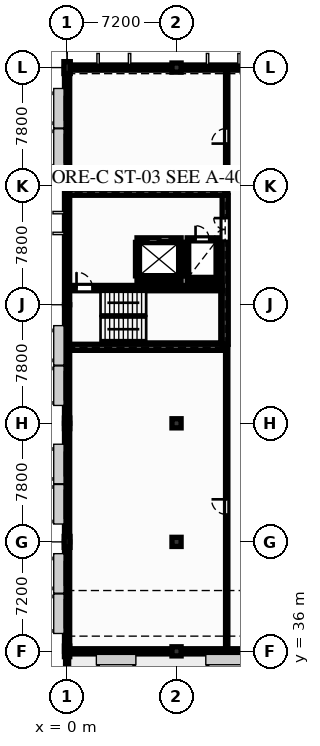
"""IFC4 building model, lengths in metres.
Left out: names, types, materials, properties, quantities, classifications, styles, units other than length and angle.
Written with IfcOpenShell. Run it as: python <this file> out.ifc"""

import sys

from ifc_helpers import new_model, si_unit, direction, frame, frame_2d, origin, origin_2d, place, context, subcontext, project, spatial, rectangle, extrude, element, fill, save


model = new_model("IFC4")
c1 = context("Model", 3, precision=1e-05, world=origin(), true_north=direction((0.0, 1.0)))
c2 = subcontext(c1, "Body", "Model", "MODEL_VIEW")
j1 = project(units=[si_unit("LENGTHUNIT", "METRE"), si_unit("PLANEANGLEUNIT", "RADIAN")], contexts=[c1])
p1 = place(None, origin())
s1 = spatial("IfcSite", under=j1, at=p1, CompositionType="ELEMENT")
p2 = place(p1, origin())
s2 = spatial("IfcBuilding", under=s1, at=p2, CompositionType="ELEMENT")
p3 = place(p2, frame((0.0, 0.0, 8.94)))
s3 = spatial("IfcBuildingStorey", under=s2, at=p3, CompositionType="ELEMENT", Elevation=8.94)
p4 = place(p3, frame((0.0, 36.0, 0.0), z_axis=(0.0, 0.0, 1.0), x_axis=(1.0, 0.0, 0.0)))
e1 = element("IfcColumn", 1, at=p4, inside=s3, PredefinedType="PILASTER", context=c2, shape_type="SweptSolid", body=[
    extrude(rectangle(XDim=0.35, YDim=0.7, at=origin_2d()), origin(), (0.0, 0.0, 1.0), 3.84),
])
p5 = place(p3, frame((0.0, 43.2, 0.0), z_axis=(0.0, 0.0, 1.0), x_axis=(1.0, 0.0, 0.0)))
e2 = element("IfcColumn", 2, at=p5, inside=s3, PredefinedType="PILASTER", context=c2, shape_type="SweptSolid", body=[
    extrude(rectangle(XDim=0.38, YDim=0.72, at=origin_2d()), origin(), (0.0, 0.0, 1.0), 3.84),
])
p6 = place(p3, frame((0.0, 51.0, 0.0), z_axis=(0.0, 0.0, 1.0), x_axis=(1.0, 0.0, 0.0)))
e3 = element("IfcColumn", 3, at=p6, inside=s3, PredefinedType="PILASTER", context=c2, shape_type="SweptSolid", body=[
    extrude(rectangle(XDim=0.35, YDim=0.7, at=origin_2d()), origin(), (0.0, 0.0, 1.0), 3.84),
])
p7 = place(p3, frame((0.0, 74.4, 0.0), z_axis=(0.0, 0.0, 1.0), x_axis=(1.0, 0.0, 0.0)))
e4 = element("IfcColumn", 4, at=p7, inside=s3, PredefinedType="PILASTER", context=c2, shape_type="SweptSolid", body=[
    extrude(rectangle(XDim=0.42, YDim=0.78, at=origin_2d()), origin(), (0.0, 0.0, 1.0), 3.84),
])
for number, where, z_axis, x_axis in (
    (5, (7.2, 36.0, 0.0), (0.0, 0.0, 1.0), (1.0, 0.0, 0.0)),
    (6, (7.2, 43.2, 0.0), (0.0, 0.0, 1.0), (1.0, 0.0, 0.0)),
    (7, (7.2, 51.0, 0.0), (0.0, 0.0, 1.0), (1.0, 0.0, 0.0)),
    (8, (7.2, 74.4, 0.0), (0.0, 0.0, 1.0), (1.0, 0.0, 0.0)),
):
    element("IfcColumn", number, at=place(p3, frame(where, z_axis=z_axis, x_axis=x_axis)), inside=s3, PredefinedType="COLUMN", context=c2, shape_type="SweptSolid", body=[
        extrude(rectangle(XDim=0.6, YDim=0.6, at=origin_2d()), origin(), (0.0, 0.0, 1.0), 3.84),
    ])
p8 = place(p3, frame((0.0, 36.0, 0.0), z_axis=(0.0, 0.0, 1.0), x_axis=(0.0, 1.0, 0.0)))
e9 = element("IfcWall", 9, at=p8, inside=s3, PredefinedType="SOLIDWALL", context=c2, shape_type="SweptSolid", body=[
    extrude(rectangle(XDim=7.2, YDim=0.34, at=frame_2d((3.6, 0.0))), origin(), (0.0, 0.0, 1.0), 3.53),
])
p9 = place(p8, frame((1.5, 0.0, 0.85)))
e10 = element("IfcOpeningElement", 10, at=p9, cuts=e9, PredefinedType="OPENING", context=c2, shape_type="SweptSolid", body=[
    extrude(rectangle(XDim=1.95, YDim=2.1, at=frame_2d((0.975, 1.05))), frame((0.0, 0.18, 0.0), z_axis=(0.0, -1.0, 0.0), x_axis=(1.0, 0.0, 0.0)), (0.0, 0.0, 1.0), 0.36),
])
p10 = place(p8, frame((4.3, 0.0, 0.798)))
e11 = element("IfcOpeningElement", 11, at=p10, cuts=e9, PredefinedType="OPENING", context=c2, shape_type="SweptSolid", body=[
    extrude(rectangle(XDim=1.65, YDim=2.25, at=frame_2d((0.825, 1.125))), frame((0.0, 0.18, 0.0), z_axis=(0.0, -1.0, 0.0), x_axis=(1.0, 0.0, 0.0)), (0.0, 0.0, 1.0), 0.36),
])
p11 = place(p3, frame((0.0, 43.2, 0.0), z_axis=(0.0, 0.0, 1.0), x_axis=(0.0, 1.0, 0.0)))
e12 = element("IfcWall", 12, at=p11, inside=s3, PredefinedType="SOLIDWALL", context=c2, shape_type="SweptSolid", body=[
    extrude(rectangle(XDim=7.8, YDim=0.34, at=frame_2d((3.9, 0.0))), origin(), (0.0, 0.0, 1.0), 3.53),
])
p12 = place(p11, frame((1.5, 0.0, 0.85)))
e13 = element("IfcOpeningElement", 13, at=p12, cuts=e12, PredefinedType="OPENING", context=c2, shape_type="SweptSolid", body=[
    extrude(rectangle(XDim=1.95, YDim=2.1, at=frame_2d((0.975, 1.05))), frame((0.0, 0.18, 0.0), z_axis=(0.0, -1.0, 0.0), x_axis=(1.0, 0.0, 0.0)), (0.0, 0.0, 1.0), 0.36),
])
p13 = place(p11, frame((4.3, 0.0, 0.798)))
e14 = element("IfcOpeningElement", 14, at=p13, cuts=e12, PredefinedType="OPENING", context=c2, shape_type="SweptSolid", body=[
    extrude(rectangle(XDim=1.65, YDim=2.25, at=frame_2d((0.825, 1.125))), frame((0.0, 0.18, 0.0), z_axis=(0.0, -1.0, 0.0), x_axis=(1.0, 0.0, 0.0)), (0.0, 0.0, 1.0), 0.36),
])
p14 = place(p3, frame((0.0, 51.0, 0.0), z_axis=(0.0, 0.0, 1.0), x_axis=(0.0, 1.0, 0.0)))
e15 = element("IfcWall", 15, at=p14, inside=s3, PredefinedType="SOLIDWALL", context=c2, shape_type="SweptSolid", body=[
    extrude(rectangle(XDim=7.8, YDim=0.34, at=frame_2d((3.9, 0.0))), origin(), (0.0, 0.0, 1.0), 3.53),
])
p15 = place(p14, frame((1.5, 0.0, 0.85)))
e16 = element("IfcOpeningElement", 16, at=p15, cuts=e15, PredefinedType="OPENING", context=c2, shape_type="SweptSolid", body=[
    extrude(rectangle(XDim=1.95, YDim=2.1, at=frame_2d((0.975, 1.05))), frame((0.0, 0.18, 0.0), z_axis=(0.0, -1.0, 0.0), x_axis=(1.0, 0.0, 0.0)), (0.0, 0.0, 1.0), 0.36),
])
p16 = place(p3, frame((0.0, 58.8, 0.0), z_axis=(0.0, 0.0, 1.0), x_axis=(0.0, 1.0, 0.0)))
e17 = element("IfcWall", 17, at=p16, inside=s3, PredefinedType="SOLIDWALL", context=c2, shape_type="SweptSolid", body=[
    extrude(rectangle(XDim=7.8, YDim=0.34, at=frame_2d((3.9, 0.0))), origin(), (0.0, 0.0, 1.0), 3.53),
])
p17 = place(p16, frame((4.85, 0.0, 1.1)))
e18 = element("IfcOpeningElement", 18, at=p17, cuts=e17, PredefinedType="OPENING", context=c2, shape_type="SweptSolid", body=[
    extrude(rectangle(XDim=1.05, YDim=1.75, at=frame_2d((0.525, 0.875))), frame((0.0, 0.18, 0.0), z_axis=(0.0, -1.0, 0.0), x_axis=(1.0, 0.0, 0.0)), (0.0, 0.0, 1.0), 0.36),
])
p18 = place(p3, frame((0.0, 66.6, 0.0), z_axis=(0.0, 0.0, 1.0), x_axis=(0.0, 1.0, 0.0)))
e19 = element("IfcWall", 19, at=p18, inside=s3, PredefinedType="SOLIDWALL", context=c2, shape_type="SweptSolid", body=[
    extrude(rectangle(XDim=7.8, YDim=0.34, at=frame_2d((3.9, 0.0))), origin(), (0.0, 0.0, 1.0), 3.53),
])
p19 = place(p18, frame((1.5, 0.0, 0.85)))
e20 = element("IfcOpeningElement", 20, at=p19, cuts=e19, PredefinedType="OPENING", context=c2, shape_type="SweptSolid", body=[
    extrude(rectangle(XDim=1.95, YDim=2.1, at=frame_2d((0.975, 1.05))), frame((0.0, 0.18, 0.0), z_axis=(0.0, -1.0, 0.0), x_axis=(1.0, 0.0, 0.0)), (0.0, 0.0, 1.0), 0.36),
])
p20 = place(p18, frame((4.3, 0.0, 0.85)))
e21 = element("IfcOpeningElement", 21, at=p20, cuts=e19, PredefinedType="OPENING", context=c2, shape_type="SweptSolid", body=[
    extrude(rectangle(XDim=1.65, YDim=2.25, at=frame_2d((0.825, 1.125))), frame((0.0, 0.18, 0.0), z_axis=(0.0, -1.0, 0.0), x_axis=(1.0, 0.0, 0.0)), (0.0, 0.0, 1.0), 0.36),
])
p21 = place(p3, frame((0.0, 74.4, 0.0), z_axis=(0.0, 0.0, 1.0), x_axis=(1.0, 0.0, 0.0)))
e22 = element("IfcWall", 22, at=p21, inside=s3, PredefinedType="SOLIDWALL", context=c2, shape_type="SweptSolid", body=[
    extrude(rectangle(XDim=7.2, YDim=0.34, at=frame_2d((3.6, 0.0))), origin(), (0.0, 0.0, 1.0), 3.53),
])
p22 = place(p21, frame((2.2, 0.0, 0.9)))
e23 = element("IfcOpeningElement", 23, at=p22, cuts=e22, PredefinedType="OPENING", context=c2, shape_type="SweptSolid", body=[
    extrude(rectangle(XDim=1.75, YDim=2.15, at=frame_2d((0.875, 1.075))), frame((0.0, 0.18, 0.0), z_axis=(0.0, -1.0, 0.0), x_axis=(1.0, 0.0, 0.0)), (0.0, 0.0, 1.0), 0.36),
])
p23 = place(p3, frame((0.0, 36.0, 0.0), z_axis=(0.0, 0.0, 1.0), x_axis=(1.0, 0.0, 0.0)))
e24 = element("IfcWall", 24, at=p23, inside=s3, PredefinedType="SOLIDWALL", context=c2, shape_type="SweptSolid", body=[
    extrude(rectangle(XDim=7.2, YDim=0.34, at=frame_2d((3.6, 0.0))), origin(), (0.0, 0.0, 1.0), 3.53),
])
p24 = place(p23, frame((2.2, 0.0, 0.9)))
e25 = element("IfcOpeningElement", 25, at=p24, cuts=e24, PredefinedType="OPENING", context=c2, shape_type="SweptSolid", body=[
    extrude(rectangle(XDim=2.05, YDim=1.85, at=frame_2d((1.025, 0.925))), frame((0.0, 0.18, 0.0), z_axis=(0.0, -1.0, 0.0), x_axis=(1.0, 0.0, 0.0)), (0.0, 0.0, 1.0), 0.36),
])
p25 = place(p3, frame((7.2, 74.4, 0.0), z_axis=(0.0, 0.0, 1.0), x_axis=(1.0, 0.0, 0.0)))
e26 = element("IfcWall", 26, at=p25, inside=s3, PredefinedType="SOLIDWALL", context=c2, shape_type="SweptSolid", body=[
    extrude(rectangle(XDim=7.2, YDim=0.34, at=frame_2d((3.6, 0.0))), origin(), (0.0, 0.0, 1.0), 3.53),
])
p26 = place(p25, frame((4.4, 0.0, 0.9)))
e27 = element("IfcOpeningElement", 27, at=p26, cuts=e26, PredefinedType="OPENING", context=c2, shape_type="SweptSolid", body=[
    extrude(rectangle(XDim=1.75, YDim=2.15, at=frame_2d((0.875, 1.075))), frame((0.0, 0.18, 0.0), z_axis=(0.0, -1.0, 0.0), x_axis=(1.0, 0.0, 0.0)), (0.0, 0.0, 1.0), 0.36),
])
p27 = place(p3, frame((7.2, 36.0, 0.0), z_axis=(0.0, 0.0, 1.0), x_axis=(1.0, 0.0, 0.0)))
e28 = element("IfcWall", 28, at=p27, inside=s3, PredefinedType="SOLIDWALL", context=c2, shape_type="SweptSolid", body=[
    extrude(rectangle(XDim=7.2, YDim=0.34, at=frame_2d((3.6, 0.0))), origin(), (0.0, 0.0, 1.0), 3.53),
])
p28 = place(p27, frame((4.4, 0.0, 0.9)))
e29 = element("IfcOpeningElement", 29, at=p28, cuts=e28, PredefinedType="OPENING", context=c2, shape_type="SweptSolid", body=[
    extrude(rectangle(XDim=2.05, YDim=1.85, at=frame_2d((1.025, 0.925))), frame((0.0, 0.18, 0.0), z_axis=(0.0, -1.0, 0.0), x_axis=(1.0, 0.0, 0.0)), (0.0, 0.0, 1.0), 0.36),
])
p29 = place(p3, frame((0.0, 35.8, 0.0), z_axis=(0.0, 0.0, 1.0), x_axis=(0.0, -1.0, 0.0)))
e30 = element("IfcWall", 30, at=p29, inside=s3, PredefinedType="PARAPET", context=c2, shape_type="SweptSolid", body=[
    extrude(rectangle(XDim=6.8, YDim=0.2, at=frame_2d((3.4, 0.0))), origin(), (0.0, 0.0, 1.0), 0.72),
])
for number, where, z_axis, x_axis in (
    (31, (0.17, 56.0, 0.0), (0.0, 0.0, 1.0), (1.0, 0.0, 0.0)),
    (32, (0.17, 66.2, 0.0), (0.0, 0.0, 1.0), (1.0, 0.0, 0.0)),
):
    element("IfcWall", number, at=place(p3, frame(where, z_axis=z_axis, x_axis=x_axis)), inside=s3, PredefinedType="SHEAR", context=c2, shape_type="SweptSolid", body=[
        extrude(rectangle(XDim=10.23, YDim=0.4, at=frame_2d((5.115, 0.0))), origin(), (0.0, 0.0, 1.0), 3.53),
    ])
p30 = place(p3, frame((10.4, 56.2, 0.0), z_axis=(0.0, 0.0, 1.0), x_axis=(0.0, 1.0, 0.0)))
e33 = element("IfcWall", 33, at=p30, inside=s3, PredefinedType="SHEAR", context=c2, shape_type="SweptSolid", body=[
    extrude(rectangle(XDim=9.8, YDim=0.4, at=frame_2d((4.9, 0.0))), origin(), (0.0, 0.0, 1.0), 3.53),
])
p31 = place(p30, frame((6.8, 0.0, 0.0)))
e34 = element("IfcOpeningElement", 34, at=p31, cuts=e33, PredefinedType="OPENING", context=c2, shape_type="SweptSolid", body=[
    extrude(rectangle(XDim=1.5, YDim=2.2, at=frame_2d((0.75, 1.1))), frame((0.0, 0.21, 0.0), z_axis=(0.0, -1.0, 0.0), x_axis=(1.0, 0.0, 0.0)), (0.0, 0.0, 1.0), 0.42),
])
p32 = place(p3, frame((0.17, 59.895, 0.0), z_axis=(0.0, 0.0, 1.0), x_axis=(1.0, 0.0, 0.0)))
e35 = element("IfcWall", 35, at=p32, inside=s3, PredefinedType="SHEAR", context=c2, shape_type="SweptSolid", body=[
    extrude(rectangle(XDim=10.03, YDim=0.35, at=frame_2d((5.015, 0.0))), origin(), (0.0, 0.0, 1.0), 3.53),
])
p33 = place(p32, frame((0.45, 0.0, 0.0)))
e36 = element("IfcOpeningElement", 36, at=p33, cuts=e35, PredefinedType="OPENING", context=c2, shape_type="SweptSolid", body=[
    extrude(rectangle(XDim=1.05, YDim=2.2, at=frame_2d((0.525, 1.1))), frame((0.0, 0.185, 0.0), z_axis=(0.0, -1.0, 0.0), x_axis=(1.0, 0.0, 0.0)), (0.0, 0.0, 1.0), 0.37),
])
p34 = place(p3, frame((4.6, 60.5, 0.0), z_axis=(0.0, 0.0, 1.0), x_axis=(1.0, 0.0, 0.0)))
e37 = element("IfcWall", 37, at=p34, inside=s3, PredefinedType="PARTITIONING", context=c2, shape_type="SweptSolid", body=[
    extrude(rectangle(XDim=2.9, YDim=0.2, at=frame_2d((1.45, 0.0))), origin(), (0.0, 0.0, 1.0), 3.53),
])
p35 = place(p3, frame((4.6, 63.1, 0.0), z_axis=(0.0, 0.0, 1.0), x_axis=(1.0, 0.0, 0.0)))
e38 = element("IfcWall", 38, at=p35, inside=s3, PredefinedType="PARTITIONING", context=c2, shape_type="SweptSolid", body=[
    extrude(rectangle(XDim=2.9, YDim=0.2, at=frame_2d((1.45, 0.0))), origin(), (0.0, 0.0, 1.0), 3.53),
])
p36 = place(p35, frame((0.75, 0.0, 0.0)))
e39 = element("IfcOpeningElement", 39, at=p36, cuts=e38, PredefinedType="OPENING", context=c2, shape_type="SweptSolid", body=[
    extrude(rectangle(XDim=1.4, YDim=2.25, at=frame_2d((0.7, 1.125))), frame((0.0, 0.11, 0.0), z_axis=(0.0, -1.0, 0.0), x_axis=(1.0, 0.0, 0.0)), (0.0, 0.0, 1.0), 0.22),
])
for number, where, z_axis, x_axis in (
    (40, (4.6, 60.7, 0.0), (0.0, 0.0, 1.0), (0.0, 1.0, 0.0)),
    (41, (7.5, 60.7, 0.0), (0.0, 0.0, 1.0), (0.0, 1.0, 0.0)),
):
    element("IfcWall", number, at=place(p3, frame(where, z_axis=z_axis, x_axis=x_axis)), inside=s3, PredefinedType="PARTITIONING", context=c2, shape_type="SweptSolid", body=[
        extrude(rectangle(XDim=2.2, YDim=0.2, at=frame_2d((1.1, 0.0))), origin(), (0.0, 0.0, 1.0), 3.53),
    ])
p37 = place(p3, frame((7.9, 60.5, 0.0), z_axis=(0.0, 0.0, 1.0), x_axis=(1.0, 0.0, 0.0)))
e42 = element("IfcWall", 42, at=p37, inside=s3, PredefinedType="PARTITIONING", context=c2, shape_type="SweptSolid", body=[
    extrude(rectangle(XDim=2.0, YDim=0.2, at=frame_2d((1.0, 0.0))), origin(), (0.0, 0.0, 1.0), 3.53),
])
p38 = place(p3, frame((7.9, 63.1, 0.0), z_axis=(0.0, 0.0, 1.0), x_axis=(1.0, 0.0, 0.0)))
e43 = element("IfcWall", 43, at=p38, inside=s3, PredefinedType="PARTITIONING", context=c2, shape_type="SweptSolid", body=[
    extrude(rectangle(XDim=2.0, YDim=0.2, at=frame_2d((1.0, 0.0))), origin(), (0.0, 0.0, 1.0), 3.53),
])
p39 = place(p38, frame((0.55, 0.0, 0.0)))
e44 = element("IfcOpeningElement", 44, at=p39, cuts=e43, PredefinedType="OPENING", context=c2, shape_type="SweptSolid", body=[
    extrude(rectangle(XDim=0.9, YDim=2.1, at=frame_2d((0.45, 1.05))), frame((0.0, 0.11, 0.0), z_axis=(0.0, -1.0, 0.0), x_axis=(1.0, 0.0, 0.0)), (0.0, 0.0, 1.0), 0.22),
])
for number, where, z_axis, x_axis in (
    (45, (7.9, 60.7, 0.0), (0.0, 0.0, 1.0), (0.0, 1.0, 0.0)),
    (46, (9.9, 60.7, 0.0), (0.0, 0.0, 1.0), (0.0, 1.0, 0.0)),
):
    element("IfcWall", number, at=place(p3, frame(where, z_axis=z_axis, x_axis=x_axis)), inside=s3, PredefinedType="PARTITIONING", context=c2, shape_type="SweptSolid", body=[
        extrude(rectangle(XDim=2.2, YDim=0.2, at=frame_2d((1.1, 0.0))), origin(), (0.0, 0.0, 1.0), 3.53),
    ])
p40 = place(p3, frame((10.5, 36.0, 0.0), z_axis=(0.0, 0.0, 1.0), x_axis=(0.0, 1.0, 0.0)))
e47 = element("IfcWall", 47, at=p40, inside=s3, PredefinedType="PARTITIONING", context=c2, shape_type="SweptSolid", body=[
    extrude(rectangle(XDim=20.0, YDim=0.15, at=frame_2d((10.0, 0.0))), origin(), (0.0, 0.0, 1.0), 3.53),
])
p41 = place(p40, frame((9.0, 0.0, 0.0)))
e48 = element("IfcOpeningElement", 48, at=p41, cuts=e47, PredefinedType="OPENING", context=c2, shape_type="SweptSolid", body=[
    extrude(rectangle(XDim=1.0, YDim=2.15, at=frame_2d((0.5, 1.075))), frame((0.0, 0.085, 0.0), z_axis=(0.0, -1.0, 0.0), x_axis=(1.0, 0.0, 0.0)), (0.0, 0.0, 1.0), 0.17),
])
p42 = place(p3, frame((10.5, 66.2, 0.0), z_axis=(0.0, 0.0, 1.0), x_axis=(0.0, 1.0, 0.0)))
e49 = element("IfcWall", 49, at=p42, inside=s3, PredefinedType="PARTITIONING", context=c2, shape_type="SweptSolid", body=[
    extrude(rectangle(XDim=8.2, YDim=0.15, at=frame_2d((4.1, 0.0))), origin(), (0.0, 0.0, 1.0), 3.53),
])
p43 = place(p42, frame((3.2, 0.0, 0.0)))
e50 = element("IfcOpeningElement", 50, at=p43, cuts=e49, PredefinedType="OPENING", context=c2, shape_type="SweptSolid", body=[
    extrude(rectangle(XDim=1.0, YDim=2.15, at=frame_2d((0.5, 1.075))), frame((0.0, 0.085, 0.0), z_axis=(0.0, -1.0, 0.0), x_axis=(1.0, 0.0, 0.0)), (0.0, 0.0, 1.0), 0.17),
])
p44 = place(p9, origin())
e51 = element("IfcWindow", 51, at=p44, inside=s3, PartitioningType="SINGLE_PANEL", PredefinedType="WINDOW", context=c2, shape_type="SweptSolid", body=[
    extrude(rectangle(XDim=1.95, YDim=2.1, at=frame_2d((0.975, 1.05))), frame((0.0, 0.03, 0.0), z_axis=(0.0, -1.0, 0.0), x_axis=(1.0, 0.0, 0.0)), (0.0, 0.0, 1.0), 0.06),
])
fill(e10, e51)
p45 = place(p10, origin())
e52 = element("IfcWindow", 52, at=p45, inside=s3, PartitioningType="SINGLE_PANEL", PredefinedType="WINDOW", context=c2, shape_type="SweptSolid", body=[
    extrude(rectangle(XDim=1.65, YDim=2.25, at=frame_2d((0.825, 1.125))), frame((0.0, 0.03, 0.0), z_axis=(0.0, -1.0, 0.0), x_axis=(1.0, 0.0, 0.0)), (0.0, 0.0, 1.0), 0.06),
])
fill(e11, e52)
p46 = place(p12, origin())
e53 = element("IfcWindow", 53, at=p46, inside=s3, PartitioningType="SINGLE_PANEL", PredefinedType="WINDOW", context=c2, shape_type="SweptSolid", body=[
    extrude(rectangle(XDim=1.95, YDim=2.1, at=frame_2d((0.975, 1.05))), frame((0.0, 0.03, 0.0), z_axis=(0.0, -1.0, 0.0), x_axis=(1.0, 0.0, 0.0)), (0.0, 0.0, 1.0), 0.06),
])
fill(e13, e53)
p47 = place(p13, origin())
e54 = element("IfcWindow", 54, at=p47, inside=s3, PartitioningType="SINGLE_PANEL", PredefinedType="WINDOW", context=c2, shape_type="SweptSolid", body=[
    extrude(rectangle(XDim=1.65, YDim=2.25, at=frame_2d((0.825, 1.125))), frame((0.0, 0.03, 0.0), z_axis=(0.0, -1.0, 0.0), x_axis=(1.0, 0.0, 0.0)), (0.0, 0.0, 1.0), 0.06),
])
fill(e14, e54)
p48 = place(p15, origin())
e55 = element("IfcWindow", 55, at=p48, inside=s3, PartitioningType="SINGLE_PANEL", PredefinedType="WINDOW", context=c2, shape_type="SweptSolid", body=[
    extrude(rectangle(XDim=1.95, YDim=2.1, at=frame_2d((0.975, 1.05))), frame((0.0, 0.03, 0.0), z_axis=(0.0, -1.0, 0.0), x_axis=(1.0, 0.0, 0.0)), (0.0, 0.0, 1.0), 0.06),
])
fill(e16, e55)
p49 = place(p17, origin())
e56 = element("IfcWindow", 56, at=p49, inside=s3, PartitioningType="SINGLE_PANEL", PredefinedType="WINDOW", context=c2, shape_type="SweptSolid", body=[
    extrude(rectangle(XDim=1.05, YDim=1.75, at=frame_2d((0.525, 0.875))), frame((0.0, 0.03, 0.0), z_axis=(0.0, -1.0, 0.0), x_axis=(1.0, 0.0, 0.0)), (0.0, 0.0, 1.0), 0.06),
])
fill(e18, e56)
p50 = place(p19, origin())
e57 = element("IfcWindow", 57, at=p50, inside=s3, PartitioningType="SINGLE_PANEL", PredefinedType="WINDOW", context=c2, shape_type="SweptSolid", body=[
    extrude(rectangle(XDim=1.95, YDim=2.1, at=frame_2d((0.975, 1.05))), frame((0.0, 0.03, 0.0), z_axis=(0.0, -1.0, 0.0), x_axis=(1.0, 0.0, 0.0)), (0.0, 0.0, 1.0), 0.06),
])
fill(e20, e57)
p51 = place(p20, origin())
e58 = element("IfcWindow", 58, at=p51, inside=s3, PartitioningType="SINGLE_PANEL", PredefinedType="WINDOW", context=c2, shape_type="SweptSolid", body=[
    extrude(rectangle(XDim=1.65, YDim=2.25, at=frame_2d((0.825, 1.125))), frame((0.0, 0.03, 0.0), z_axis=(0.0, -1.0, 0.0), x_axis=(1.0, 0.0, 0.0)), (0.0, 0.0, 1.0), 0.06),
])
fill(e21, e58)
p52 = place(p22, origin())
e59 = element("IfcWindow", 59, at=p52, inside=s3, PartitioningType="SINGLE_PANEL", PredefinedType="WINDOW", context=c2, shape_type="SweptSolid", body=[
    extrude(rectangle(XDim=1.75, YDim=2.15, at=frame_2d((0.875, 1.075))), frame((0.0, 0.03, 0.0), z_axis=(0.0, -1.0, 0.0), x_axis=(1.0, 0.0, 0.0)), (0.0, 0.0, 1.0), 0.06),
])
fill(e23, e59)
p53 = place(p24, origin())
e60 = element("IfcWindow", 60, at=p53, inside=s3, PartitioningType="SINGLE_PANEL", PredefinedType="WINDOW", context=c2, shape_type="SweptSolid", body=[
    extrude(rectangle(XDim=2.05, YDim=1.85, at=frame_2d((1.025, 0.925))), frame((0.0, 0.03, 0.0), z_axis=(0.0, -1.0, 0.0), x_axis=(1.0, 0.0, 0.0)), (0.0, 0.0, 1.0), 0.06),
])
fill(e25, e60)
p54 = place(p31, origin())
e61 = element("IfcDoor", 61, at=p54, inside=s3, OperationType="DOUBLE_DOOR_SINGLE_SWING", PredefinedType="DOOR", context=c2, shape_type="SweptSolid", body=[
    extrude(rectangle(XDim=1.5, YDim=2.2, at=frame_2d((0.75, 1.1))), frame((0.0, 0.025, 0.0), z_axis=(0.0, -1.0, 0.0), x_axis=(1.0, 0.0, 0.0)), (0.0, 0.0, 1.0), 0.05),
])
fill(e34, e61)
p55 = place(p33, origin())
e62 = element("IfcDoor", 62, at=p55, inside=s3, OperationType="SINGLE_SWING_LEFT", PredefinedType="DOOR", context=c2, shape_type="SweptSolid", body=[
    extrude(rectangle(XDim=1.05, YDim=2.2, at=frame_2d((0.525, 1.1))), frame((0.0, 0.025, 0.0), z_axis=(0.0, -1.0, 0.0), x_axis=(1.0, 0.0, 0.0)), (0.0, 0.0, 1.0), 0.05),
])
fill(e36, e62)
p56 = place(p36, origin())
e63 = element("IfcDoor", 63, at=p56, inside=s3, OperationType="SLIDING_TO_LEFT", PredefinedType="DOOR", context=c2, shape_type="SweptSolid", body=[
    extrude(rectangle(XDim=1.4, YDim=2.25, at=frame_2d((0.7, 1.125))), frame((0.0, 0.025, 0.0), z_axis=(0.0, -1.0, 0.0), x_axis=(1.0, 0.0, 0.0)), (0.0, 0.0, 1.0), 0.05),
])
fill(e39, e63)
p57 = place(p39, origin())
e64 = element("IfcDoor", 64, at=p57, inside=s3, OperationType="SINGLE_SWING_LEFT", PredefinedType="DOOR", context=c2, shape_type="SweptSolid", body=[
    extrude(rectangle(XDim=0.9, YDim=2.1, at=frame_2d((0.45, 1.05))), frame((0.0, 0.025, 0.0), z_axis=(0.0, -1.0, 0.0), x_axis=(1.0, 0.0, 0.0)), (0.0, 0.0, 1.0), 0.05),
])
fill(e44, e64)
p58 = place(p41, origin())
e65 = element("IfcDoor", 65, at=p58, inside=s3, OperationType="SINGLE_SWING_RIGHT", PredefinedType="DOOR", context=c2, shape_type="SweptSolid", body=[
    extrude(rectangle(XDim=1.0, YDim=2.15, at=frame_2d((0.5, 1.075))), frame((0.0, 0.025, 0.0), z_axis=(0.0, -1.0, 0.0), x_axis=(1.0, 0.0, 0.0)), (0.0, 0.0, 1.0), 0.05),
])
fill(e48, e65)
p59 = place(p43, origin())
e66 = element("IfcDoor", 66, at=p59, inside=s3, OperationType="SINGLE_SWING_LEFT", PredefinedType="DOOR", context=c2, shape_type="SweptSolid", body=[
    extrude(rectangle(XDim=1.0, YDim=2.15, at=frame_2d((0.5, 1.075))), frame((0.0, 0.025, 0.0), z_axis=(0.0, -1.0, 0.0), x_axis=(1.0, 0.0, 0.0)), (0.0, 0.0, 1.0), 0.05),
])
fill(e50, e66)
save(model, sys.argv[1])
